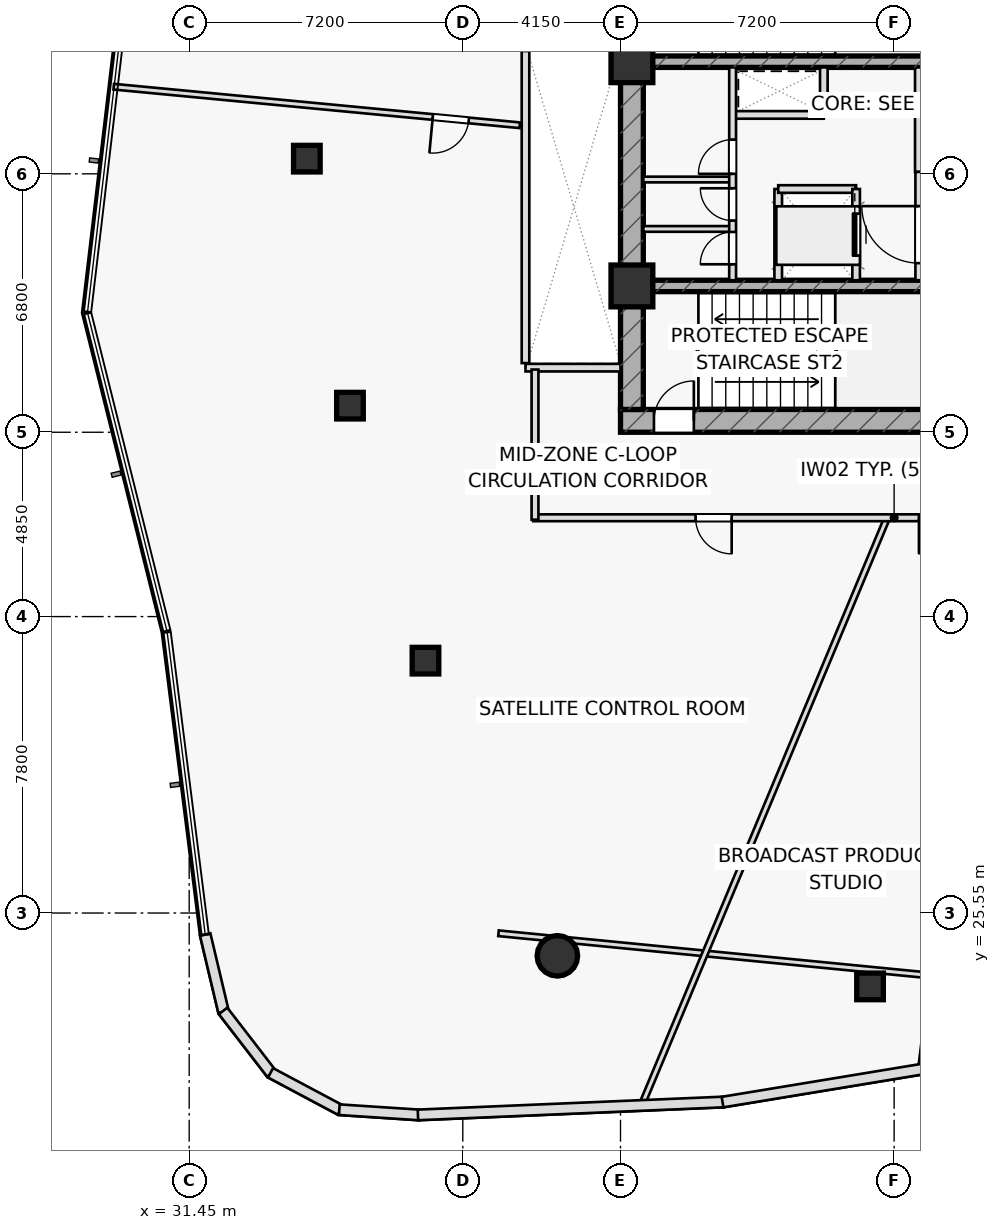
"""IFC4 building model, lengths in metres.
Left out: names, types, materials, properties, quantities, classifications, styles, units other than length and angle.
Written with IfcOpenShell. Run it as: python <this file> out.ifc"""

import sys

from ifc_helpers import new_model, si_unit, direction, frame, frame_2d, origin, origin_2d, place, context, subcontext, project, spatial, rectangle, hollow_rectangle, hollow_circle, extrude, element, fill, save


model = new_model("IFC4")
c1 = context("Model", 3, precision=1e-05, world=origin(), true_north=direction((0.0, 1.0)))
c2 = subcontext(c1, "Body", "Model", "MODEL_VIEW")
j1 = project(units=[si_unit("LENGTHUNIT", "METRE"), si_unit("PLANEANGLEUNIT", "RADIAN")], contexts=[c1])
p1 = place(None, origin())
s1 = spatial("IfcSite", under=j1, at=p1, CompositionType="ELEMENT")
p2 = place(p1, origin())
s2 = spatial("IfcBuilding", under=s1, at=p2, CompositionType="ELEMENT")
p3 = place(p2, frame((0.0, 0.0, 115.6)))
s3 = spatial("IfcBuildingStorey", under=s2, at=p3, CompositionType="ELEMENT", Elevation=115.6)
p4 = place(p3, frame((42.8, 38.5, 0.0), z_axis=(0.0, 0.0, 1.0), x_axis=(1.0, 0.0, 0.0)))
e1 = element("IfcWall", 1, at=p4, inside=s3, PredefinedType="SHEAR", context=c2, shape_type="SweptSolid", body=[
    extrude(rectangle(XDim=14.4, YDim=0.6, at=frame_2d((7.2, 0.0))), origin(), (0.0, 0.0, 1.0), 3.55),
])
p5 = place(p4, frame((0.88, 0.0, 0.0)))
e2 = element("IfcOpeningElement", 2, at=p5, cuts=e1, PredefinedType="OPENING", context=c2, shape_type="SweptSolid", body=[
    extrude(rectangle(XDim=1.05, YDim=2.2, at=frame_2d((0.525, 1.1))), frame((0.0, 0.31, 0.0), z_axis=(0.0, -1.0, 0.0), x_axis=(1.0, 0.0, 0.0)), (0.0, 0.0, 1.0), 0.62),
])
p6 = place(p3, frame((43.1, 38.8, 0.0), z_axis=(0.0, 0.0, 1.0), x_axis=(0.0, 1.0, 0.0)))
e3 = element("IfcWall", 3, at=p6, inside=s3, PredefinedType="SHEAR", context=c2, shape_type="SweptSolid", body=[
    extrude(rectangle(XDim=12.4, YDim=0.6, at=frame_2d((6.2, 0.0))), origin(), (0.0, 0.0, 1.0), 3.55),
])
p7 = place(p3, frame((43.4, 47.95, 0.0), z_axis=(0.0, 0.0, 1.0), x_axis=(1.0, 0.0, 0.0)))
e4 = element("IfcWall", 4, at=p7, inside=s3, PredefinedType="SHEAR", context=c2, shape_type="SweptSolid", body=[
    extrude(rectangle(XDim=13.2, YDim=0.3, at=frame_2d((6.6, 0.0))), origin(), (0.0, 0.0, 1.0), 3.55),
])
p8 = place(p7, frame((8.345, 0.0, 0.0)))
e5 = element("IfcOpeningElement", 5, at=p8, cuts=e4, PredefinedType="OPENING", context=c2, shape_type="SweptSolid", body=[
    extrude(rectangle(XDim=1.15, YDim=2.2, at=frame_2d((0.575, 1.1))), frame((0.0, 0.16, 0.0), z_axis=(0.0, -1.0, 0.0), x_axis=(1.0, 0.0, 0.0)), (0.0, 0.0, 1.0), 0.32),
])
p9 = place(p7, frame((10.065, 0.0, 0.0)))
e6 = element("IfcOpeningElement", 6, at=p9, cuts=e4, PredefinedType="OPENING", context=c2, shape_type="SweptSolid", body=[
    extrude(rectangle(XDim=1.15, YDim=2.2, at=frame_2d((0.575, 1.1))), frame((0.0, 0.16, 0.0), z_axis=(0.0, -1.0, 0.0), x_axis=(1.0, 0.0, 0.0)), (0.0, 0.0, 1.0), 0.32),
])
p10 = place(p7, frame((11.645, 0.0, 0.0)))
e7 = element("IfcOpeningElement", 7, at=p10, cuts=e4, PredefinedType="OPENING", context=c2, shape_type="SweptSolid", body=[
    extrude(rectangle(XDim=1.15, YDim=2.2, at=frame_2d((0.575, 1.1))), frame((0.0, 0.16, 0.0), z_axis=(0.0, -1.0, 0.0), x_axis=(1.0, 0.0, 0.0)), (0.0, 0.0, 1.0), 0.32),
])
p11 = place(p3, frame((43.4, 42.05, 0.0), z_axis=(0.0, 0.0, 1.0), x_axis=(1.0, 0.0, 0.0)))
e8 = element("IfcWall", 8, at=p11, inside=s3, PredefinedType="SHEAR", context=c2, shape_type="SweptSolid", body=[
    extrude(rectangle(XDim=13.2, YDim=0.3, at=frame_2d((6.6, 0.0))), origin(), (0.0, 0.0, 1.0), 3.55),
])
p12 = place(p11, frame((8.37, 0.0, 0.0)))
e9 = element("IfcOpeningElement", 9, at=p12, cuts=e8, PredefinedType="OPENING", context=c2, shape_type="SweptSolid", body=[
    extrude(rectangle(XDim=1.1, YDim=2.15, at=frame_2d((0.55, 1.075))), frame((0.0, 0.16, 0.0), z_axis=(0.0, -1.0, 0.0), x_axis=(1.0, 0.0, 0.0)), (0.0, 0.0, 1.0), 0.32),
])
p13 = place(p11, frame((10.09, 0.0, 0.0)))
e10 = element("IfcOpeningElement", 10, at=p13, cuts=e8, PredefinedType="OPENING", context=c2, shape_type="SweptSolid", body=[
    extrude(rectangle(XDim=1.1, YDim=2.15, at=frame_2d((0.55, 1.075))), frame((0.0, 0.16, 0.0), z_axis=(0.0, -1.0, 0.0), x_axis=(1.0, 0.0, 0.0)), (0.0, 0.0, 1.0), 0.32),
])
p14 = place(p11, frame((11.83, 0.0, 0.0)))
e11 = element("IfcOpeningElement", 11, at=p14, cuts=e8, PredefinedType="OPENING", context=c2, shape_type="SweptSolid", body=[
    extrude(rectangle(XDim=1.1, YDim=2.15, at=frame_2d((0.55, 1.075))), frame((0.0, 0.16, 0.0), z_axis=(0.0, -1.0, 0.0), x_axis=(1.0, 0.0, 0.0)), (0.0, 0.0, 1.0), 0.32),
])
for number, where, z_axis, x_axis in (
    (12, (43.1, 47.95, 0.0), (0.0, 0.0, 1.0), (1.0, 0.0, 0.0)),
    (13, (43.1, 42.05, 0.0), (0.0, 0.0, 1.0), (1.0, 0.0, 0.0)),
):
    element("IfcColumn", number, at=place(p3, frame(where, z_axis=z_axis, x_axis=x_axis)), inside=s3, PredefinedType="COLUMN", context=c2, shape_type="SweptSolid", body=[
        extrude(rectangle(XDim=1.1, YDim=1.1, at=origin_2d()), origin(), (0.0, 0.0, 1.0), 3.55),
    ])
for number, where, z_axis, x_axis in (
    (14, (34.546, 45.399, 0.0), (0.0, 0.0, 1.0), (1.0, 0.0, 0.0)),
    (15, (35.681, 38.9, 0.0), (0.0, 0.0, 1.0), (1.0, 0.0, 0.0)),
    (16, (37.668, 32.19, 0.0), (0.0, 0.0, 1.0), (1.0, 0.0, 0.0)),
):
    element("IfcColumn", number, at=place(p3, frame(where, z_axis=z_axis, x_axis=x_axis)), inside=s3, PredefinedType="COLUMN", context=c2, shape_type="SweptSolid", body=[
        extrude(hollow_rectangle(XDim=0.7, YDim=0.7, WallThickness=0.04, at=origin_2d()), origin(), (0.0, 0.0, 1.0), 3.55),
    ])
p15 = place(p3, frame((41.139, 24.424, 0.0), z_axis=(0.0, 0.0, 1.0), x_axis=(1.0, 0.0, 0.0)))
e17 = element("IfcColumn", 17, at=p15, inside=s3, PredefinedType="COLUMN", context=c2, shape_type="SweptSolid", body=[
    extrude(hollow_circle(Radius=0.533, WallThickness=0.045, at=origin_2d()), origin(), (0.0, 0.0, 1.0), 3.55),
])
p16 = place(p3, frame((49.366, 23.619, 0.0), z_axis=(0.0, 0.0, 1.0), x_axis=(1.0, 0.0, 0.0)))
e18 = element("IfcColumn", 18, at=p16, inside=s3, PredefinedType="COLUMN", context=c2, shape_type="SweptSolid", body=[
    extrude(hollow_rectangle(XDim=0.7, YDim=0.7, WallThickness=0.04, at=origin_2d()), origin(), (0.0, 0.0, 1.0), 3.55),
])
p17 = place(p3, frame((40.3, 39.9, 0.0), z_axis=(0.0, 0.0, 1.0), x_axis=(1.0, 0.0, 0.0)))
e19 = element("IfcWall", 19, at=p17, inside=s3, PredefinedType="PARTITIONING", context=c2, shape_type="SweptSolid", body=[
    extrude(rectangle(XDim=2.5, YDim=0.2, at=frame_2d((1.25, 0.0))), origin(), (0.0, 0.0, 1.0), 3.55),
])
p18 = place(p3, frame((45.75, 46.55, 0.0), z_axis=(0.0, 0.0, 1.0), x_axis=(1.0, 0.0, 0.0)))
e20 = element("IfcWall", 20, at=p18, inside=s3, PredefinedType="PARTITIONING", context=c2, shape_type="SweptSolid", body=[
    extrude(rectangle(XDim=2.4, YDim=0.2, at=frame_2d((1.2, 0.0))), origin(), (0.0, 0.0, 1.0), 3.55),
])
p19 = place(p3, frame((48.15, 46.55, 0.0), z_axis=(0.0, 0.0, 1.0), x_axis=(0.0, 1.0, 0.0)))
e21 = element("IfcWall", 21, at=p19, inside=s3, PredefinedType="PARTITIONING", context=c2, shape_type="SweptSolid", body=[
    extrude(rectangle(XDim=1.25, YDim=0.2, at=frame_2d((0.625, 0.0))), origin(), (0.0, 0.0, 1.0), 3.55),
])
p20 = place(p3, frame((46.95, 42.2, 0.0), z_axis=(0.0, 0.0, 1.0), x_axis=(0.0, 1.0, 0.0)))
e22 = element("IfcWall", 22, at=p20, inside=s3, PredefinedType="PARTITIONING", context=c2, shape_type="SweptSolid", body=[
    extrude(rectangle(XDim=2.4, YDim=0.2, at=frame_2d((1.2, 0.0))), origin(), (0.0, 0.0, 1.0), 3.55),
])
p21 = place(p3, frame((46.95, 44.6, 0.0), z_axis=(0.0, 0.0, 1.0), x_axis=(1.0, 0.0, 0.0)))
e23 = element("IfcWall", 23, at=p21, inside=s3, PredefinedType="PARTITIONING", context=c2, shape_type="SweptSolid", body=[
    extrude(rectangle(XDim=2.05, YDim=0.2, at=frame_2d((1.025, 0.0))), origin(), (0.0, 0.0, 1.0), 3.55),
])
p22 = place(p3, frame((50.65, 45.05, 0.0), z_axis=(0.0, 0.0, 1.0), x_axis=(1.0, 0.0, 0.0)))
e24 = element("IfcWall", 24, at=p22, inside=s3, PredefinedType="PARTITIONING", context=c2, shape_type="SweptSolid", body=[
    extrude(rectangle(XDim=5.95, YDim=0.2, at=frame_2d((2.975, 0.0))), origin(), (0.0, 0.0, 1.0), 3.55),
])
p23 = place(p22, frame((1.35, 0.0, 0.0)))
e25 = element("IfcOpeningElement", 25, at=p23, cuts=e24, PredefinedType="OPENING", context=c2, shape_type="SweptSolid", body=[
    extrude(rectangle(XDim=1.5, YDim=2.2, at=frame_2d((0.75, 1.1))), frame((0.0, 0.11, 0.0), z_axis=(0.0, -1.0, 0.0), x_axis=(1.0, 0.0, 0.0)), (0.0, 0.0, 1.0), 0.22),
])
p24 = place(p3, frame((50.65, 45.05, 0.0), z_axis=(0.0, 0.0, 1.0), x_axis=(0.0, 1.0, 0.0)))
e26 = element("IfcWall", 26, at=p24, inside=s3, PredefinedType="PARTITIONING", context=c2, shape_type="SweptSolid", body=[
    extrude(rectangle(XDim=2.75, YDim=0.2, at=frame_2d((1.375, 0.0))), origin(), (0.0, 0.0, 1.0), 3.55),
])
p25 = place(p3, frame((50.65, 42.2, 0.0), z_axis=(0.0, 0.0, 1.0), x_axis=(0.0, 1.0, 0.0)))
e27 = element("IfcWall", 27, at=p25, inside=s3, PredefinedType="PARTITIONING", context=c2, shape_type="SweptSolid", body=[
    extrude(rectangle(XDim=2.85, YDim=0.18, at=frame_2d((1.425, 0.0))), origin(), (0.0, 0.0, 1.0), 3.55),
])
p26 = place(p25, frame((0.45, 0.0, 0.0)))
e28 = element("IfcOpeningElement", 28, at=p26, cuts=e27, PredefinedType="OPENING", context=c2, shape_type="SweptSolid", body=[
    extrude(rectangle(XDim=1.5, YDim=2.2, at=frame_2d((0.75, 1.1))), frame((0.0, 0.1, 0.0), z_axis=(0.0, -1.0, 0.0), x_axis=(1.0, 0.0, 0.0)), (0.0, 0.0, 1.0), 0.2),
])
for number, where, z_axis, x_axis in (
    (29, (43.4, 43.55, 0.0), (0.0, 0.0, 1.0), (1.0, 0.0, 0.0)),
    (30, (43.4, 44.85, 0.0), (0.0, 0.0, 1.0), (1.0, 0.0, 0.0)),
):
    element("IfcWall", number, at=place(p3, frame(where, z_axis=z_axis, x_axis=x_axis)), inside=s3, PredefinedType="PARTITIONING", context=c2, shape_type="SweptSolid", body=[
        extrude(rectangle(XDim=2.35, YDim=0.15, at=frame_2d((1.175, 0.0))), origin(), (0.0, 0.0, 1.0), 3.55),
    ])
p27 = place(p3, frame((45.75, 42.2, 0.0), z_axis=(0.0, 0.0, 1.0), x_axis=(0.0, 1.0, 0.0)))
e31 = element("IfcWall", 31, at=p27, inside=s3, PredefinedType="PARTITIONING", context=c2, shape_type="SweptSolid", body=[
    extrude(rectangle(XDim=5.6, YDim=0.18, at=frame_2d((2.8, 0.0))), origin(), (0.0, 0.0, 1.0), 3.55),
])
p28 = place(p27, frame((0.42, 0.0, 0.0)))
e32 = element("IfcOpeningElement", 32, at=p28, cuts=e31, PredefinedType="OPENING", context=c2, shape_type="SweptSolid", body=[
    extrude(rectangle(XDim=0.85, YDim=2.05, at=frame_2d((0.425, 1.025))), frame((0.0, 0.1, 0.0), z_axis=(0.0, -1.0, 0.0), x_axis=(1.0, 0.0, 0.0)), (0.0, 0.0, 1.0), 0.2),
])
p29 = place(p27, frame((1.57, 0.0, 0.0)))
e33 = element("IfcOpeningElement", 33, at=p29, cuts=e31, PredefinedType="OPENING", context=c2, shape_type="SweptSolid", body=[
    extrude(rectangle(XDim=0.85, YDim=2.05, at=frame_2d((0.425, 1.025))), frame((0.0, 0.1, 0.0), z_axis=(0.0, -1.0, 0.0), x_axis=(1.0, 0.0, 0.0)), (0.0, 0.0, 1.0), 0.2),
])
p30 = place(p27, frame((2.8, 0.0, 0.0)))
e34 = element("IfcOpeningElement", 34, at=p30, cuts=e31, PredefinedType="OPENING", context=c2, shape_type="SweptSolid", body=[
    extrude(rectangle(XDim=0.9, YDim=2.05, at=frame_2d((0.45, 1.025))), frame((0.0, 0.1, 0.0), z_axis=(0.0, -1.0, 0.0), x_axis=(1.0, 0.0, 0.0)), (0.0, 0.0, 1.0), 0.2),
])
p31 = place(p3, frame((39.589, 25.018, 0.0), z_axis=(0.0, 0.0, 1.0), x_axis=(0.99524905582, -0.097361783517, 0.0)))
e35 = element("IfcWall", 35, at=p31, inside=s3, PredefinedType="PARTITIONING", context=c2, shape_type="SweptSolid", body=[
    extrude(rectangle(XDim=11.467, YDim=0.15, at=frame_2d((5.733, 0.0))), origin(), (0.0, 0.0, 1.0), 2.835),
])
p32 = place(p3, frame((52.489, 35.95, 0.0), z_axis=(0.0, 0.0, 1.0), x_axis=(-0.121867943368, -0.992546323543, 0.0)))
e36 = element("IfcWall", 36, at=p32, inside=s3, PredefinedType="PARTITIONING", context=c2, shape_type="SweptSolid", body=[
    extrude(rectangle(XDim=14.632, YDim=0.15, at=frame_2d((7.316, 0.0))), origin(), (0.0, 0.0, 1.0), 2.975),
])
p33 = place(p3, frame((40.15, 46.278, 0.0), z_axis=(0.0, 0.0, 1.0), x_axis=(-0.995517526957, 0.09457723575, 0.0)))
e37 = element("IfcWall", 37, at=p33, inside=s3, PredefinedType="PARTITIONING", context=c2, shape_type="SweptSolid", body=[
    extrude(rectangle(XDim=10.733, YDim=0.15, at=frame_2d((5.367, 0.0))), origin(), (0.0, 0.0, 1.0), 2.835),
])
p34 = place(p33, frame((1.35, 0.0, 0.0)))
e38 = element("IfcOpeningElement", 38, at=p34, cuts=e37, PredefinedType="OPENING", context=c2, shape_type="SweptSolid", body=[
    extrude(rectangle(XDim=0.95, YDim=2.05, at=frame_2d((0.475, 1.025))), frame((0.0, 0.085, 0.0), z_axis=(0.0, -1.0, 0.0), x_axis=(1.0, 0.0, 0.0)), (0.0, 0.0, 1.0), 0.17),
])
p35 = place(p3, frame((49.817, 35.95, 0.0), z_axis=(0.0, 0.0, 1.0), x_axis=(-0.385665325274, -0.922638746683, 0.0)))
e39 = element("IfcWall", 39, at=p35, inside=s3, PredefinedType="PARTITIONING", context=c2, shape_type="SweptSolid", body=[
    extrude(rectangle(XDim=16.771, YDim=0.15, at=frame_2d((8.385, 0.0))), origin(), (0.0, 0.0, 1.0), 2.835),
])
p36 = place(p3, frame((59.5, 35.95, 0.0), z_axis=(0.0, 0.0, 1.0), x_axis=(-1.0, 0.0, 0.0)))
e40 = element("IfcWall", 40, at=p36, inside=s3, PredefinedType="PARTITIONING", context=c2, shape_type="SweptSolid", body=[
    extrude(rectangle(XDim=19.0, YDim=0.18, at=frame_2d((9.5, 0.0))), origin(), (0.0, 0.0, 1.0), 2.835),
])
p37 = place(p36, frame((3.155, 0.0, 0.0)))
e41 = element("IfcOpeningElement", 41, at=p37, cuts=e40, PredefinedType="OPENING", context=c2, shape_type="SweptSolid", body=[
    extrude(rectangle(XDim=0.95, YDim=2.05, at=frame_2d((0.475, 1.025))), frame((0.0, 0.1, 0.0), z_axis=(0.0, -1.0, 0.0), x_axis=(1.0, 0.0, 0.0)), (0.0, 0.0, 1.0), 0.2),
])
p38 = place(p36, frame((7.897, 0.0, 0.0)))
e42 = element("IfcOpeningElement", 42, at=p38, cuts=e40, PredefinedType="OPENING", context=c2, shape_type="SweptSolid", body=[
    extrude(rectangle(XDim=0.95, YDim=2.05, at=frame_2d((0.475, 1.025))), frame((0.0, 0.1, 0.0), z_axis=(0.0, -1.0, 0.0), x_axis=(1.0, 0.0, 0.0)), (0.0, 0.0, 1.0), 0.2),
])
p39 = place(p36, frame((13.774, 0.0, 0.0)))
e43 = element("IfcOpeningElement", 43, at=p39, cuts=e40, PredefinedType="OPENING", context=c2, shape_type="SweptSolid", body=[
    extrude(rectangle(XDim=0.95, YDim=2.05, at=frame_2d((0.475, 1.025))), frame((0.0, 0.1, 0.0), z_axis=(0.0, -1.0, 0.0), x_axis=(1.0, 0.0, 0.0)), (0.0, 0.0, 1.0), 0.2),
])
p40 = place(p3, frame((40.55, 35.9, 0.0), z_axis=(0.0, 0.0, 1.0), x_axis=(0.0, 1.0, 0.0)))
e44 = element("IfcWall", 44, at=p40, inside=s3, PredefinedType="PARTITIONING", context=c2, shape_type="SweptSolid", body=[
    extrude(rectangle(XDim=3.95, YDim=0.18, at=frame_2d((1.975, 0.0))), origin(), (0.0, 0.0, 1.0), 2.835),
])
p41 = place(p3, frame((31.872, 24.985, 0.0), z_axis=(0.0, 0.0, 1.0), x_axis=(0.230852959635, -0.972988648972, 0.0)))
e45 = element("IfcWall", 45, at=p41, inside=s3, PredefinedType="STANDARD", context=c2, shape_type="SweptSolid", body=[
    extrude(rectangle(XDim=2.093, YDim=0.28, at=frame_2d((1.046, 0.0))), origin(), (0.0, 0.0, 1.0), 3.55),
])
p42 = place(p3, frame((32.342, 22.975, 0.0), z_axis=(0.0, 0.0, 1.0), x_axis=(0.610866481305, -0.791733630723, 0.0)))
e46 = element("IfcWall", 46, at=p42, inside=s3, PredefinedType="STANDARD", context=c2, shape_type="SweptSolid", body=[
    extrude(rectangle(XDim=2.082, YDim=0.28, at=frame_2d((1.041, 0.0))), origin(), (0.0, 0.0, 1.0), 3.55),
])
p43 = place(p3, frame((33.591, 21.345, 0.0), z_axis=(0.0, 0.0, 1.0), x_axis=(0.882537949576, -0.470241180203, 0.0)))
e47 = element("IfcWall", 47, at=p43, inside=s3, PredefinedType="STANDARD", context=c2, shape_type="SweptSolid", body=[
    extrude(rectangle(XDim=2.081, YDim=0.28, at=frame_2d((1.041, 0.0))), origin(), (0.0, 0.0, 1.0), 3.55),
])
p44 = place(p3, frame((35.4, 20.375, 0.0), z_axis=(0.0, 0.0, 1.0), x_axis=(0.997863527184, -0.065332848681, 0.0)))
e48 = element("IfcWall", 48, at=p44, inside=s3, PredefinedType="STANDARD", context=c2, shape_type="SweptSolid", body=[
    extrude(rectangle(XDim=2.104, YDim=0.28, at=frame_2d((1.052, 0.0))), origin(), (0.0, 0.0, 1.0), 3.55),
])
p45 = place(p3, frame((37.469, 20.238, 0.0), z_axis=(0.0, 0.0, 1.0), x_axis=(0.999106386845, 0.042266153898, 0.0)))
e49 = element("IfcWall", 49, at=p45, inside=s3, PredefinedType="STANDARD", context=c2, shape_type="SweptSolid", body=[
    extrude(rectangle(XDim=8.052, YDim=0.28, at=frame_2d((4.026, 0.0))), origin(), (0.0, 0.0, 1.0), 3.55),
])
p46 = place(p3, frame((45.485, 20.575, 0.0), z_axis=(0.0, 0.0, 1.0), x_axis=(0.986644726954, 0.162887024572, 0.0)))
e50 = element("IfcWall", 50, at=p46, inside=s3, PredefinedType="STANDARD", context=c2, shape_type="SweptSolid", body=[
    extrude(rectangle(XDim=8.04, YDim=0.28, at=frame_2d((4.02, 0.0))), origin(), (0.0, 0.0, 1.0), 3.55),
])
p47 = place(p3, frame((40.3, 40.02, 0.0), z_axis=(0.0, 0.0, 1.0), x_axis=(0.0, 1.0, 0.0)))
e51 = element("IfcWall", 51, at=p47, inside=s3, PredefinedType="PARTITIONING", context=c2, shape_type="SweptSolid", body=[
    extrude(rectangle(XDim=8.21, YDim=0.2, at=frame_2d((4.105, 0.0))), origin(), (0.0, 0.0, 1.0), 3.55),
])
p48 = place(p3, frame((49.0, 42.2, 0.0), z_axis=(0.0, 0.0, 1.0), x_axis=(0.0, 1.0, 0.0)))
e52 = element("IfcWall", 52, at=p48, inside=s3, PredefinedType="PARTITIONING", context=c2, shape_type="SweptSolid", body=[
    extrude(rectangle(XDim=2.4, YDim=0.2, at=frame_2d((1.2, 0.0))), origin(), (0.0, 0.0, 1.0), 3.55),
])
p49 = place(p48, frame((0.65, 0.0, 0.0)))
e53 = element("IfcOpeningElement", 53, at=p49, cuts=e52, PredefinedType="OPENING", context=c2, shape_type="SweptSolid", body=[
    extrude(rectangle(XDim=1.1, YDim=2.15, at=frame_2d((0.55, 1.075))), frame((0.0, 0.11, 0.0), z_axis=(0.0, -1.0, 0.0), x_axis=(1.0, 0.0, 0.0)), (0.0, 0.0, 1.0), 0.22),
])
p50 = place(p5, origin())
e54 = element("IfcDoor", 54, at=p50, inside=s3, OperationType="SINGLE_SWING_RIGHT", PredefinedType="DOOR", context=c2, shape_type="SweptSolid", body=[
    extrude(rectangle(XDim=1.05, YDim=2.2, at=frame_2d((0.525, 1.1))), frame((0.0, 0.025, 0.0), z_axis=(0.0, -1.0, 0.0), x_axis=(1.0, 0.0, 0.0)), (0.0, 0.0, 1.0), 0.05),
])
fill(e2, e54)
p51 = place(p26, origin())
e55 = element("IfcDoor", 55, at=p51, inside=s3, OperationType="SINGLE_SWING_RIGHT", PredefinedType="DOOR", context=c2, shape_type="SweptSolid", body=[
    extrude(rectangle(XDim=1.5, YDim=2.2, at=frame_2d((0.75, 1.1))), frame((0.0, 0.025, 0.0), z_axis=(0.0, -1.0, 0.0), x_axis=(1.0, 0.0, 0.0)), (0.0, 0.0, 1.0), 0.05),
])
fill(e28, e55)
p52 = place(p28, origin())
e56 = element("IfcDoor", 56, at=p52, inside=s3, OperationType="SINGLE_SWING_LEFT", PredefinedType="DOOR", context=c2, shape_type="SweptSolid", body=[
    extrude(rectangle(XDim=0.85, YDim=2.05, at=frame_2d((0.425, 1.025))), frame((0.0, 0.025, 0.0), z_axis=(0.0, -1.0, 0.0), x_axis=(1.0, 0.0, 0.0)), (0.0, 0.0, 1.0), 0.05),
])
fill(e32, e56)
p53 = place(p29, origin())
e57 = element("IfcDoor", 57, at=p53, inside=s3, OperationType="SINGLE_SWING_RIGHT", PredefinedType="DOOR", context=c2, shape_type="SweptSolid", body=[
    extrude(rectangle(XDim=0.85, YDim=2.05, at=frame_2d((0.425, 1.025))), frame((0.0, 0.025, 0.0), z_axis=(0.0, -1.0, 0.0), x_axis=(1.0, 0.0, 0.0)), (0.0, 0.0, 1.0), 0.05),
])
fill(e33, e57)
p54 = place(p30, origin())
e58 = element("IfcDoor", 58, at=p54, inside=s3, OperationType="SINGLE_SWING_LEFT", PredefinedType="DOOR", context=c2, shape_type="SweptSolid", body=[
    extrude(rectangle(XDim=0.9, YDim=2.05, at=frame_2d((0.45, 1.025))), frame((0.0, 0.025, 0.0), z_axis=(0.0, -1.0, 0.0), x_axis=(1.0, 0.0, 0.0)), (0.0, 0.0, 1.0), 0.05),
])
fill(e34, e58)
p55 = place(p34, origin())
e59 = element("IfcDoor", 59, at=p55, inside=s3, OperationType="SINGLE_SWING_RIGHT", PredefinedType="DOOR", context=c2, shape_type="SweptSolid", body=[
    extrude(rectangle(XDim=0.95, YDim=2.05, at=frame_2d((0.475, 1.025))), frame((0.0, 0.025, 0.0), z_axis=(0.0, -1.0, 0.0), x_axis=(1.0, 0.0, 0.0)), (0.0, 0.0, 1.0), 0.05),
])
fill(e38, e59)
p56 = place(p38, origin())
e60 = element("IfcDoor", 60, at=p56, inside=s3, OperationType="SINGLE_SWING_RIGHT", PredefinedType="DOOR", context=c2, shape_type="SweptSolid", body=[
    extrude(rectangle(XDim=0.95, YDim=2.05, at=frame_2d((0.475, 1.025))), frame((0.0, 0.025, 0.0), z_axis=(0.0, -1.0, 0.0), x_axis=(1.0, 0.0, 0.0)), (0.0, 0.0, 1.0), 0.05),
])
fill(e42, e60)
p57 = place(p39, origin())
e61 = element("IfcDoor", 61, at=p57, inside=s3, OperationType="SINGLE_SWING_LEFT", PredefinedType="DOOR", context=c2, shape_type="SweptSolid", body=[
    extrude(rectangle(XDim=0.95, YDim=2.05, at=frame_2d((0.475, 1.025))), frame((0.0, 0.025, 0.0), z_axis=(0.0, -1.0, 0.0), x_axis=(1.0, 0.0, 0.0)), (0.0, 0.0, 1.0), 0.05),
])
fill(e43, e61)
p58 = place(p49, origin())
e62 = element("IfcDoor", 62, at=p58, inside=s3, OperationType="SLIDING_TO_RIGHT", PredefinedType="DOOR", context=c2, shape_type="SweptSolid", body=[
    extrude(rectangle(XDim=1.1, YDim=2.15, at=frame_2d((0.55, 1.075))), frame((0.0, 0.025, 0.0), z_axis=(0.0, -1.0, 0.0), x_axis=(1.0, 0.0, 0.0)), (0.0, 0.0, 1.0), 0.05),
])
fill(e53, e62)
save(model, sys.argv[1])
